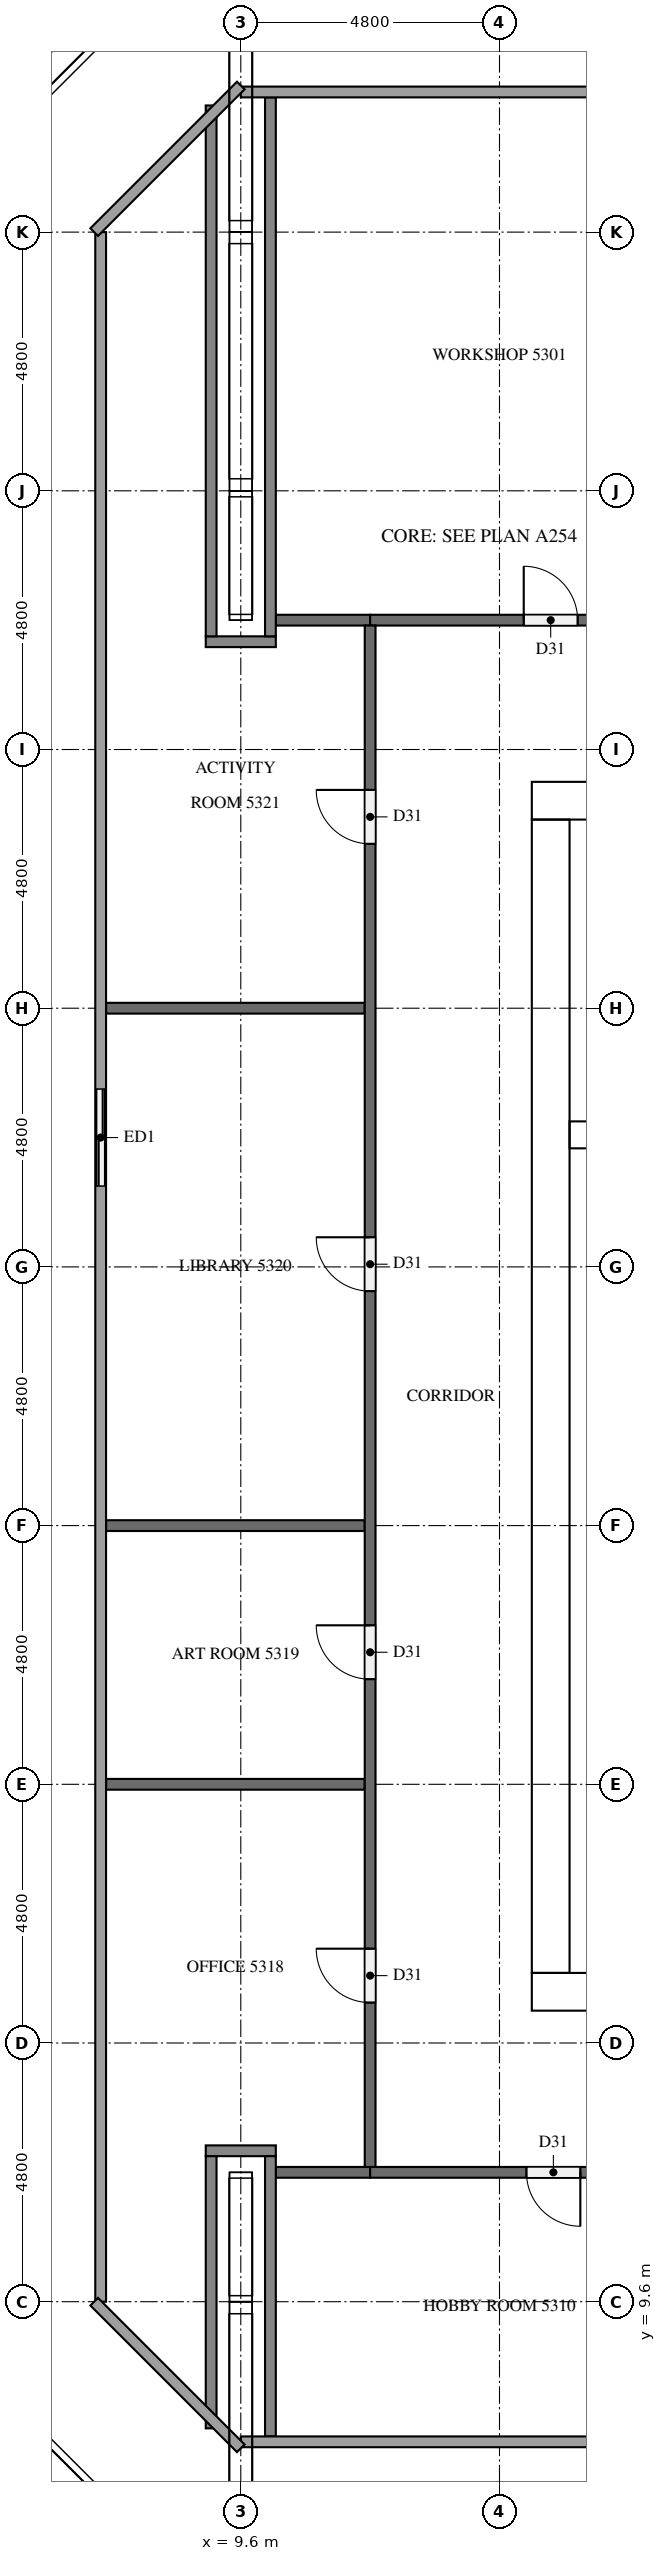
"""IFC4 building model, lengths in metres.
Left out: names, types, materials, properties, quantities, classifications, styles, units other than length and angle.
Written with IfcOpenShell. Run it as: python <this file> out.ifc"""

import sys

from ifc_helpers import new_model, si_unit, direction, frame, frame_2d, origin, place, context, subcontext, project, spatial, rectangle, extrude, element, fill, save


model = new_model("IFC4")
c1 = context("Model", 3, precision=1e-05, world=origin(), true_north=direction((0.0, 1.0)))
c2 = subcontext(c1, "Body", "Model", "MODEL_VIEW")
j1 = project(units=[si_unit("LENGTHUNIT", "METRE"), si_unit("PLANEANGLEUNIT", "RADIAN")], contexts=[c1])
p1 = place(None, origin())
s1 = spatial("IfcSite", under=j1, at=p1, CompositionType="ELEMENT")
p2 = place(p1, origin())
s2 = spatial("IfcBuilding", under=s1, at=p2, CompositionType="ELEMENT")
p3 = place(p2, frame((0.0, 0.0, 203.4)))
s3 = spatial("IfcBuildingStorey", under=s2, at=p3, CompositionType="ELEMENT", Elevation=203.4)
p4 = place(p3, frame((15.0, 15.35, 0.0), z_axis=(0.0, 0.0, 1.0), x_axis=(1.0, 0.0, 0.0)))
e1 = element("IfcWall", 1, at=p4, inside=s3, PredefinedType="SHEAR", context=c2, shape_type="SweptSolid", body=[
    extrude(rectangle(XDim=32.4, YDim=0.7, at=frame_2d((16.2, 0.0))), origin(), (0.0, 0.0, 1.0), 5.1),
])
p5 = place(p4, frame((15.3, 0.0, 0.0)))
e2 = element("IfcOpeningElement", 2, at=p5, cuts=e1, PredefinedType="OPENING", context=c2, shape_type="SweptSolid", body=[
    extrude(rectangle(XDim=1.8, YDim=2.1, at=frame_2d((0.9, 1.05))), frame((0.0, 0.36, 0.0), z_axis=(0.0, -1.0, 0.0), x_axis=(1.0, 0.0, 0.0)), (0.0, 0.0, 1.0), 0.72),
])
p6 = place(p3, frame((15.0, 37.45, 0.0), z_axis=(0.0, 0.0, 1.0), x_axis=(1.0, 0.0, 0.0)))
e3 = element("IfcWall", 3, at=p6, inside=s3, PredefinedType="SHEAR", context=c2, shape_type="SweptSolid", body=[
    extrude(rectangle(XDim=32.4, YDim=0.7, at=frame_2d((16.2, 0.0))), origin(), (0.0, 0.0, 1.0), 5.1),
])
p7 = place(p6, frame((15.3, 0.0, 0.0)))
e4 = element("IfcOpeningElement", 4, at=p7, cuts=e3, PredefinedType="OPENING", context=c2, shape_type="SweptSolid", body=[
    extrude(rectangle(XDim=1.8, YDim=2.1, at=frame_2d((0.9, 1.05))), frame((0.0, 0.36, 0.0), z_axis=(0.0, -1.0, 0.0), x_axis=(1.0, 0.0, 0.0)), (0.0, 0.0, 1.0), 0.72),
])
p8 = place(p6, frame((1.544, 0.0, 0.0)))
e5 = element("IfcOpeningElement", 5, at=p8, cuts=e3, PredefinedType="OPENING", context=c2, shape_type="SweptSolid", body=[
    extrude(rectangle(XDim=1.0, YDim=2.1, at=frame_2d((0.5, 1.05))), frame((0.0, 0.36, 0.0), z_axis=(0.0, -1.0, 0.0), x_axis=(1.0, 0.0, 0.0)), (0.0, 0.0, 1.0), 0.72),
])
p9 = place(p6, frame((5.219, 0.0, 0.0)))
e6 = element("IfcOpeningElement", 6, at=p9, cuts=e3, PredefinedType="OPENING", context=c2, shape_type="SweptSolid", body=[
    extrude(rectangle(XDim=1.0, YDim=2.1, at=frame_2d((0.5, 1.05))), frame((0.0, 0.36, 0.0), z_axis=(0.0, -1.0, 0.0), x_axis=(1.0, 0.0, 0.0)), (0.0, 0.0, 1.0), 0.72),
])
p10 = place(p3, frame((15.35, 15.7, 0.0), z_axis=(0.0, 0.0, 1.0), x_axis=(0.0, 1.0, 0.0)))
e7 = element("IfcWall", 7, at=p10, inside=s3, PredefinedType="SHEAR", context=c2, shape_type="SweptSolid", body=[
    extrude(rectangle(XDim=21.4, YDim=0.7, at=frame_2d((10.7, 0.0))), origin(), (0.0, 0.0, 1.0), 5.1),
])
p11 = place(p10, frame((5.06, 0.0, 0.0)))
e8 = element("IfcOpeningElement", 8, at=p11, cuts=e7, PredefinedType="OPENING", context=c2, shape_type="SweptSolid", body=[
    extrude(rectangle(XDim=1.2, YDim=2.1, at=frame_2d((0.6, 1.05))), frame((0.0, 0.36, 0.0), z_axis=(0.0, -1.0, 0.0), x_axis=(1.0, 0.0, 0.0)), (0.0, 0.0, 1.0), 0.72),
])
p12 = place(p3, frame((15.7, 31.25, 0.0), z_axis=(0.0, 0.0, 1.0), x_axis=(1.0, 0.0, 0.0)))
e9 = element("IfcWall", 9, at=p12, inside=s3, PredefinedType="SHEAR", context=c2, shape_type="SweptSolid", body=[
    extrude(rectangle(XDim=7.15, YDim=0.5, at=frame_2d((3.575, 0.0))), origin(), (0.0, 0.0, 1.0), 5.1),
])
p13 = place(p3, frame((7.0, 32.4, 0.0), z_axis=(0.0, 0.0, 1.0), x_axis=(0.0, -1.0, 0.0)))
e10 = element("IfcWall", 10, at=p13, inside=s3, PredefinedType="SOLIDWALL", context=c2, shape_type="SweptSolid", body=[
    extrude(rectangle(XDim=2.4, YDim=0.15, at=frame_2d((1.2, 0.0))), origin(), (0.0, 0.0, 1.0), 5.1),
])
p14 = place(p13, frame((0.3, 0.0, 0.0)))
e11 = element("IfcOpeningElement", 11, at=p14, cuts=e10, PredefinedType="OPENING", context=c2, shape_type="SweptSolid", body=[
    extrude(rectangle(XDim=1.8, YDim=2.4, at=frame_2d((0.9, 1.2))), frame((0.0, 0.085, 0.0), z_axis=(0.0, -1.0, 0.0), x_axis=(1.0, 0.0, 0.0)), (0.0, 0.0, 1.0), 0.17),
])
p15 = place(p3, frame((10.25, 12.0, 0.0), z_axis=(0.0, 0.0, 1.0), x_axis=(1.0, 0.0, 0.0)))
e12 = element("IfcWall", 12, at=p15, inside=s3, PredefinedType="PARTITIONING", context=c2, shape_type="SweptSolid", body=[
    extrude(rectangle(XDim=1.75, YDim=0.2, at=frame_2d((0.875, 0.0))), origin(), (0.0, 0.0, 1.0), 5.1),
])
p16 = place(p3, frame((18.75, 12.0, 0.0), z_axis=(0.0, 0.0, 1.0), x_axis=(-1.0, 0.0, 0.0)))
e13 = element("IfcWall", 13, at=p16, inside=s3, PredefinedType="PARTITIONING", context=c2, shape_type="SweptSolid", body=[
    extrude(rectangle(XDim=6.75, YDim=0.2, at=frame_2d((3.375, 0.0))), origin(), (0.0, 0.0, 1.0), 5.1),
])
p17 = place(p16, frame((2.85, 0.0, 0.0)))
e14 = element("IfcOpeningElement", 14, at=p17, cuts=e13, PredefinedType="OPENING", context=c2, shape_type="SweptSolid", body=[
    extrude(rectangle(XDim=1.0, YDim=2.1, at=frame_2d((0.5, 1.05))), frame((0.0, 0.11, 0.0), z_axis=(0.0, -1.0, 0.0), x_axis=(1.0, 0.0, 0.0)), (0.0, 0.0, 1.0), 0.22),
])
p18 = place(p3, frame((8.95, 12.4, 0.0), z_axis=(0.0, 0.0, 1.0), x_axis=(1.0, 0.0, 0.0)))
e15 = element("IfcWall", 15, at=p18, inside=s3, PredefinedType="PARTITIONING", context=c2, shape_type="SweptSolid", body=[
    extrude(rectangle(XDim=1.3, YDim=0.2, at=frame_2d((0.65, 0.0))), origin(), (0.0, 0.0, 1.0), 5.1),
])
for number, where, z_axis, x_axis in (
    (16, (7.1, 19.2, 0.0), (0.0, 0.0, 1.0), (1.0, 0.0, 0.0)),
    (17, (7.1, 24.0, 0.0), (0.0, 0.0, 1.0), (1.0, 0.0, 0.0)),
    (18, (7.1, 33.6, 0.0), (0.0, 0.0, 1.0), (1.0, 0.0, 0.0)),
):
    element("IfcWall", number, at=place(p3, frame(where, z_axis=z_axis, x_axis=x_axis)), inside=s3, PredefinedType="PARTITIONING", context=c2, shape_type="SweptSolid", body=[
        extrude(rectangle(XDim=4.8, YDim=0.2, at=frame_2d((2.4, 0.0))), origin(), (0.0, 0.0, 1.0), 5.1),
    ])
p19 = place(p3, frame((8.95, 40.4, 0.0), z_axis=(0.0, 0.0, 1.0), x_axis=(1.0, 0.0, 0.0)))
e19 = element("IfcWall", 19, at=p19, inside=s3, PredefinedType="PARTITIONING", context=c2, shape_type="SweptSolid", body=[
    extrude(rectangle(XDim=1.3, YDim=0.2, at=frame_2d((0.65, 0.0))), origin(), (0.0, 0.0, 1.0), 5.1),
])
p20 = place(p3, frame((10.25, 40.8, 0.0), z_axis=(0.0, 0.0, 1.0), x_axis=(1.0, 0.0, 0.0)))
e20 = element("IfcWall", 20, at=p20, inside=s3, PredefinedType="PARTITIONING", context=c2, shape_type="SweptSolid", body=[
    extrude(rectangle(XDim=1.75, YDim=0.2, at=frame_2d((0.875, 0.0))), origin(), (0.0, 0.0, 1.0), 5.1),
])
p21 = place(p3, frame((12.0, 40.8, 0.0), z_axis=(0.0, 0.0, 1.0), x_axis=(1.0, 0.0, 0.0)))
e21 = element("IfcWall", 21, at=p21, inside=s3, PredefinedType="PARTITIONING", context=c2, shape_type="SweptSolid", body=[
    extrude(rectangle(XDim=6.75, YDim=0.2, at=frame_2d((3.375, 0.0))), origin(), (0.0, 0.0, 1.0), 5.1),
])
p22 = place(p21, frame((2.85, 0.0, 0.0)))
e22 = element("IfcOpeningElement", 22, at=p22, cuts=e21, PredefinedType="OPENING", context=c2, shape_type="SweptSolid", body=[
    extrude(rectangle(XDim=1.0, YDim=2.1, at=frame_2d((0.5, 1.05))), frame((0.0, 0.11, 0.0), z_axis=(0.0, -1.0, 0.0), x_axis=(1.0, 0.0, 0.0)), (0.0, 0.0, 1.0), 0.22),
])
p23 = place(p3, frame((9.05, 7.25, 0.0), z_axis=(0.0, 0.0, 1.0), x_axis=(0.0, 1.0, 0.0)))
e23 = element("IfcWall", 23, at=p23, inside=s3, PredefinedType="PARTITIONING", context=c2, shape_type="SweptSolid", body=[
    extrude(rectangle(XDim=5.05, YDim=0.2, at=frame_2d((2.525, 0.0))), origin(), (0.0, 0.0, 1.0), 5.1),
])
p24 = place(p3, frame((9.05, 40.5, 0.0), z_axis=(0.0, 0.0, 1.0), x_axis=(0.0, 1.0, 0.0)))
e24 = element("IfcWall", 24, at=p24, inside=s3, PredefinedType="PARTITIONING", context=c2, shape_type="SweptSolid", body=[
    extrude(rectangle(XDim=9.85, YDim=0.2, at=frame_2d((4.925, 0.0))), origin(), (0.0, 0.0, 1.0), 5.1),
])
p25 = place(p3, frame((10.15, 7.1, 0.0), z_axis=(0.0, 0.0, 1.0), x_axis=(0.0, 1.0, 0.0)))
e25 = element("IfcWall", 25, at=p25, inside=s3, PredefinedType="PARTITIONING", context=c2, shape_type="SweptSolid", body=[
    extrude(rectangle(XDim=5.2, YDim=0.2, at=frame_2d((2.6, 0.0))), origin(), (0.0, 0.0, 1.0), 5.1),
])
p26 = place(p3, frame((10.15, 40.5, 0.0), z_axis=(0.0, 0.0, 1.0), x_axis=(0.0, 1.0, 0.0)))
e26 = element("IfcWall", 26, at=p26, inside=s3, PredefinedType="PARTITIONING", context=c2, shape_type="SweptSolid", body=[
    extrude(rectangle(XDim=10.0, YDim=0.2, at=frame_2d((5.0, 0.0))), origin(), (0.0, 0.0, 1.0), 5.1),
])
p27 = place(p3, frame((12.0, 12.1, 0.0), z_axis=(0.0, 0.0, 1.0), x_axis=(0.0, 1.0, 0.0)))
e27 = element("IfcWall", 27, at=p27, inside=s3, PredefinedType="PARTITIONING", context=c2, shape_type="SweptSolid", body=[
    extrude(rectangle(XDim=28.6, YDim=0.2, at=frame_2d((14.3, 0.0))), origin(), (0.0, 0.0, 1.0), 5.1),
])
p28 = place(p27, frame((3.05, 0.0, 0.0)))
e28 = element("IfcOpeningElement", 28, at=p28, cuts=e27, PredefinedType="OPENING", context=c2, shape_type="SweptSolid", body=[
    extrude(rectangle(XDim=1.0, YDim=2.1, at=frame_2d((0.5, 1.05))), frame((0.0, 0.11, 0.0), z_axis=(0.0, -1.0, 0.0), x_axis=(1.0, 0.0, 0.0)), (0.0, 0.0, 1.0), 0.22),
])
p29 = place(p27, frame((9.05, 0.0, 0.0)))
e29 = element("IfcOpeningElement", 29, at=p29, cuts=e27, PredefinedType="OPENING", context=c2, shape_type="SweptSolid", body=[
    extrude(rectangle(XDim=1.0, YDim=2.1, at=frame_2d((0.5, 1.05))), frame((0.0, 0.11, 0.0), z_axis=(0.0, -1.0, 0.0), x_axis=(1.0, 0.0, 0.0)), (0.0, 0.0, 1.0), 0.22),
])
p30 = place(p27, frame((16.25, 0.0, 0.0)))
e30 = element("IfcOpeningElement", 30, at=p30, cuts=e27, PredefinedType="OPENING", context=c2, shape_type="SweptSolid", body=[
    extrude(rectangle(XDim=1.0, YDim=2.1, at=frame_2d((0.5, 1.05))), frame((0.0, 0.11, 0.0), z_axis=(0.0, -1.0, 0.0), x_axis=(1.0, 0.0, 0.0)), (0.0, 0.0, 1.0), 0.22),
])
p31 = place(p27, frame((24.55, 0.0, 0.0)))
e31 = element("IfcOpeningElement", 31, at=p31, cuts=e27, PredefinedType="OPENING", context=c2, shape_type="SweptSolid", body=[
    extrude(rectangle(XDim=1.0, YDim=2.1, at=frame_2d((0.5, 1.05))), frame((0.0, 0.11, 0.0), z_axis=(0.0, -1.0, 0.0), x_axis=(1.0, 0.0, 0.0)), (0.0, 0.0, 1.0), 0.22),
])
p32 = place(p14, origin())
e32 = element("IfcDoor", 32, at=p32, inside=s3, OperationType="SLIDING_TO_LEFT", PredefinedType="DOOR", context=c2, shape_type="SweptSolid", body=[
    extrude(rectangle(XDim=1.8, YDim=2.4, at=frame_2d((0.9, 1.2))), frame((0.0, 0.025, 0.0), z_axis=(0.0, -1.0, 0.0), x_axis=(1.0, 0.0, 0.0)), (0.0, 0.0, 1.0), 0.05),
])
fill(e11, e32)
p33 = place(p11, frame((1.2, 0.0, 0.0), z_axis=(0.0, 0.0, 1.0), x_axis=(-1.0, 0.0, 0.0)))
e33 = element("IfcDoor", 33, at=p33, inside=s3, OperationType="SINGLE_SWING_RIGHT", PredefinedType="DOOR", context=c2, shape_type="SweptSolid", body=[
    extrude(rectangle(XDim=1.2, YDim=2.1, at=frame_2d((0.6, 1.05))), frame((0.0, 0.025, 0.0), z_axis=(0.0, -1.0, 0.0), x_axis=(1.0, 0.0, 0.0)), (0.0, 0.0, 1.0), 0.05),
])
fill(e8, e33)
p34 = place(p22, origin())
e34 = element("IfcDoor", 34, at=p34, inside=s3, OperationType="SINGLE_SWING_LEFT", PredefinedType="DOOR", context=c2, shape_type="SweptSolid", body=[
    extrude(rectangle(XDim=1.0, YDim=2.1, at=frame_2d((0.5, 1.05))), frame((0.0, 0.025, 0.0), z_axis=(0.0, -1.0, 0.0), x_axis=(1.0, 0.0, 0.0)), (0.0, 0.0, 1.0), 0.05),
])
fill(e22, e34)
p35 = place(p17, origin())
e35 = element("IfcDoor", 35, at=p35, inside=s3, OperationType="SINGLE_SWING_LEFT", PredefinedType="DOOR", context=c2, shape_type="SweptSolid", body=[
    extrude(rectangle(XDim=1.0, YDim=2.1, at=frame_2d((0.5, 1.05))), frame((0.0, 0.025, 0.0), z_axis=(0.0, -1.0, 0.0), x_axis=(1.0, 0.0, 0.0)), (0.0, 0.0, 1.0), 0.05),
])
fill(e14, e35)
p36 = place(p28, origin())
e36 = element("IfcDoor", 36, at=p36, inside=s3, OperationType="SINGLE_SWING_RIGHT", PredefinedType="DOOR", context=c2, shape_type="SweptSolid", body=[
    extrude(rectangle(XDim=1.0, YDim=2.1, at=frame_2d((0.5, 1.05))), frame((0.0, 0.025, 0.0), z_axis=(0.0, -1.0, 0.0), x_axis=(1.0, 0.0, 0.0)), (0.0, 0.0, 1.0), 0.05),
])
fill(e28, e36)
p37 = place(p29, origin())
e37 = element("IfcDoor", 37, at=p37, inside=s3, OperationType="SINGLE_SWING_RIGHT", PredefinedType="DOOR", context=c2, shape_type="SweptSolid", body=[
    extrude(rectangle(XDim=1.0, YDim=2.1, at=frame_2d((0.5, 1.05))), frame((0.0, 0.025, 0.0), z_axis=(0.0, -1.0, 0.0), x_axis=(1.0, 0.0, 0.0)), (0.0, 0.0, 1.0), 0.05),
])
fill(e29, e37)
p38 = place(p30, origin())
e38 = element("IfcDoor", 38, at=p38, inside=s3, OperationType="SINGLE_SWING_RIGHT", PredefinedType="DOOR", context=c2, shape_type="SweptSolid", body=[
    extrude(rectangle(XDim=1.0, YDim=2.1, at=frame_2d((0.5, 1.05))), frame((0.0, 0.025, 0.0), z_axis=(0.0, -1.0, 0.0), x_axis=(1.0, 0.0, 0.0)), (0.0, 0.0, 1.0), 0.05),
])
fill(e30, e38)
p39 = place(p31, origin())
e39 = element("IfcDoor", 39, at=p39, inside=s3, OperationType="SINGLE_SWING_RIGHT", PredefinedType="DOOR", context=c2, shape_type="SweptSolid", body=[
    extrude(rectangle(XDim=1.0, YDim=2.1, at=frame_2d((0.5, 1.05))), frame((0.0, 0.025, 0.0), z_axis=(0.0, -1.0, 0.0), x_axis=(1.0, 0.0, 0.0)), (0.0, 0.0, 1.0), 0.05),
])
fill(e31, e39)
save(model, sys.argv[1])
